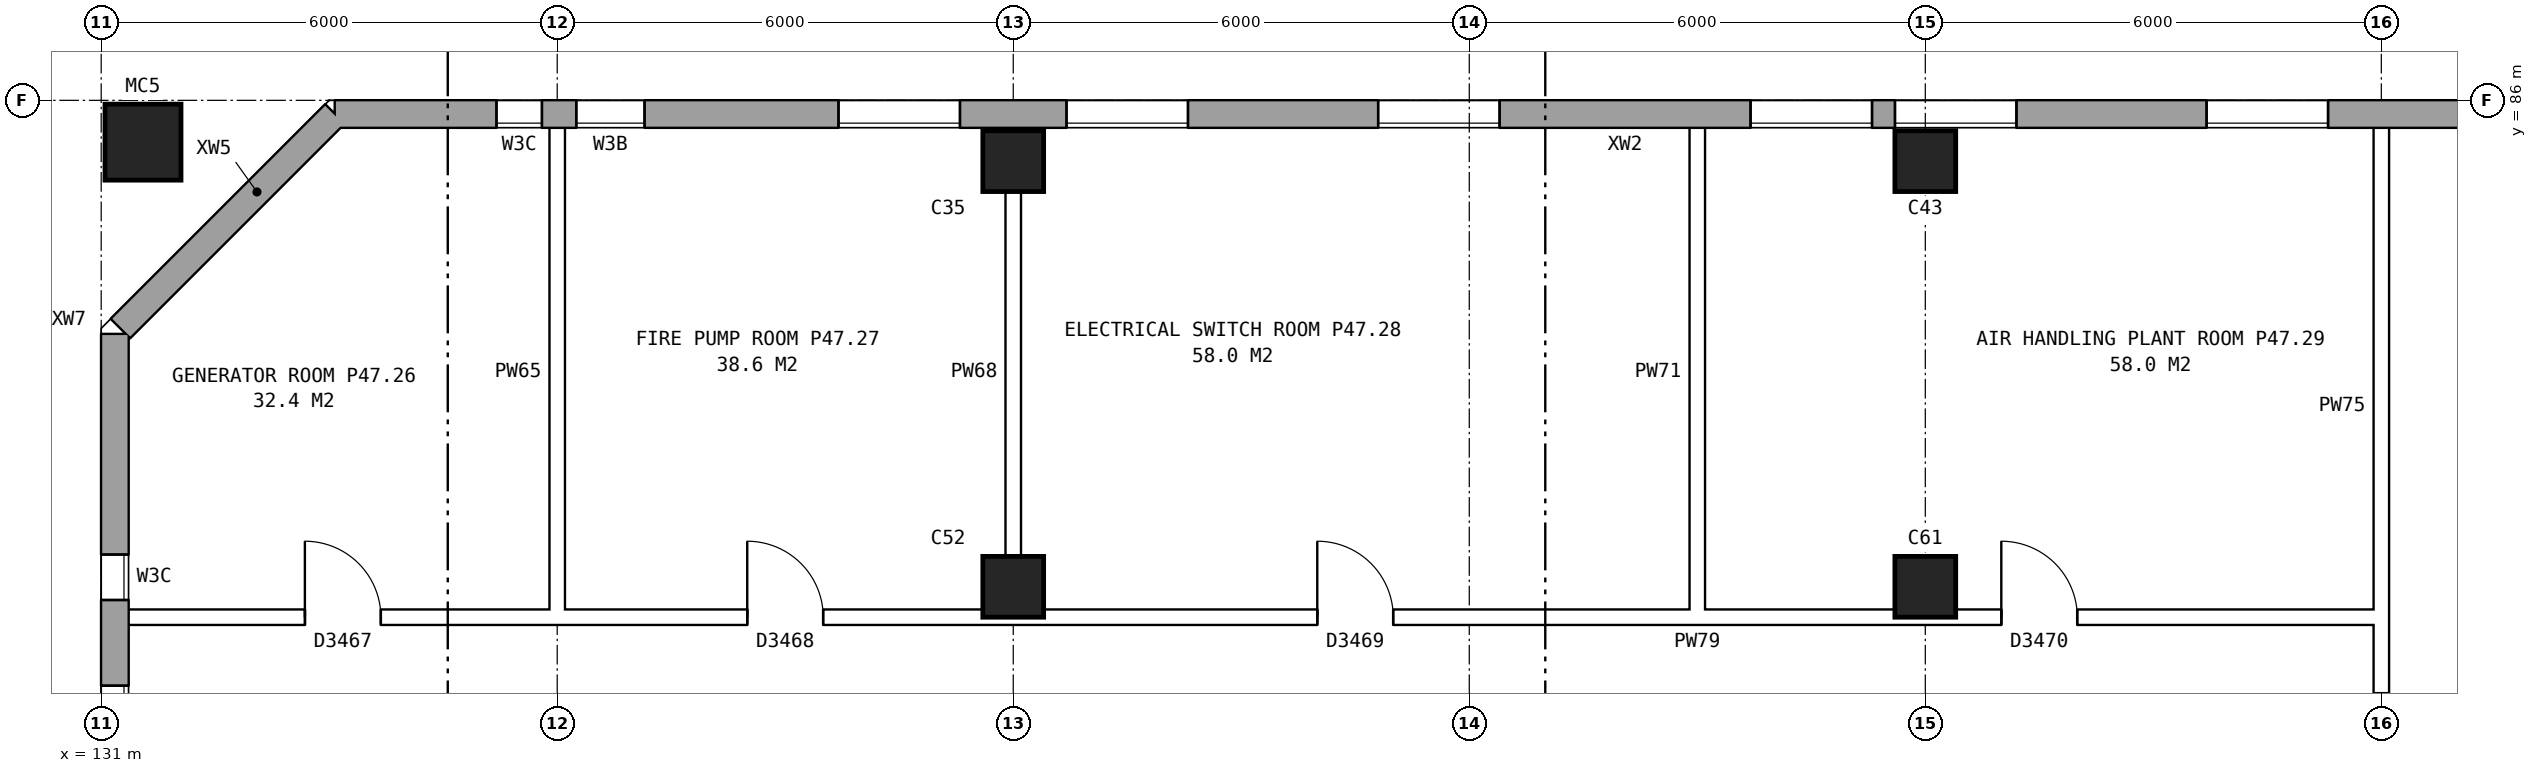
"""IFC4 building model, lengths in metres.
Left out: names, types, materials, properties, quantities, classifications, styles, units other than length and angle.
Written with IfcOpenShell. Run it as: python <this file> out.ifc"""

import sys

from ifc_helpers import new_model, si_unit, direction, frame, frame_2d, origin, origin_2d, place, context, subcontext, project, spatial, rectangle, hollow_rectangle, extrude, element, fill, save


model = new_model("IFC4")
c1 = context("Model", 3, precision=1e-05, world=origin(), true_north=direction((0.0, 1.0)))
c2 = subcontext(c1, "Body", "Model", "MODEL_VIEW")
j1 = project(units=[si_unit("LENGTHUNIT", "METRE"), si_unit("PLANEANGLEUNIT", "RADIAN")], contexts=[c1])
p1 = place(None, origin())
s1 = spatial("IfcSite", under=j1, at=p1, CompositionType="ELEMENT")
p2 = place(p1, origin())
s2 = spatial("IfcBuilding", under=s1, at=p2, CompositionType="ELEMENT")
p3 = place(p2, frame((0.0, 0.0, 167.1)))
s3 = spatial("IfcBuildingStorey", under=s2, at=p3, CompositionType="ELEMENT", Elevation=167.1)
for number, where, z_axis, x_axis in (
    (1, (143.0, 79.6, 0.0), (0.0, 0.0, 1.0), (1.0, 0.0, 0.0)),
    (2, (143.0, 85.2, 0.0), (0.0, 0.0, 1.0), (1.0, 0.0, 0.0)),
    (3, (155.0, 79.6, 0.0), (0.0, 0.0, 1.0), (1.0, 0.0, 0.0)),
    (4, (155.0, 85.2, 0.0), (0.0, 0.0, 1.0), (1.0, 0.0, 0.0)),
):
    element("IfcColumn", number, at=place(p3, frame(where, z_axis=z_axis, x_axis=x_axis)), inside=s3, PredefinedType="COLUMN", context=c2, shape_type="SweptSolid", body=[
        extrude(rectangle(XDim=0.8, YDim=0.8, at=origin_2d()), origin(), (0.0, 0.0, 1.0), 4.2),
    ])
p4 = place(p3, frame((131.55, 85.45, 0.0), z_axis=(0.0, 0.0, 1.0), x_axis=(1.0, 0.0, 0.0)))
e5 = element("IfcColumn", 5, at=p4, inside=s3, PredefinedType="COLUMN", context=c2, shape_type="SweptSolid", body=[
    extrude(hollow_rectangle(XDim=1.0, YDim=1.0, WallThickness=0.055, at=origin_2d()), origin(), (0.0, 0.0, 1.0), 4.5),
])
p5 = place(p3, frame((167.175, 85.82, 0.0), z_axis=(0.0, 0.0, 1.0), x_axis=(-1.0, 0.0, 0.0)))
e6 = element("IfcWall", 6, at=p5, inside=s3, PredefinedType="STANDARD", context=c2, shape_type="SweptSolid", body=[
    extrude(rectangle(XDim=33.101, YDim=0.36, at=frame_2d((16.55, 0.0))), origin(), (0.0, 0.0, 1.0), 4.2),
])
p6 = place(p5, frame((0.875, 0.0, 1.5)))
e7 = element("IfcOpeningElement", 7, at=p6, cuts=e6, PredefinedType="OPENING", context=c2, shape_type="SweptSolid", body=[
    extrude(rectangle(XDim=1.6, YDim=1.2, at=frame_2d((0.8, 0.6))), frame((0.0, 0.19, 0.0), z_axis=(0.0, -1.0, 0.0), x_axis=(1.0, 0.0, 0.0)), (0.0, 0.0, 1.0), 0.38),
])
p7 = place(p5, frame((2.8, 0.0, 1.5)))
e8 = element("IfcOpeningElement", 8, at=p7, cuts=e6, PredefinedType="OPENING", context=c2, shape_type="SweptSolid", body=[
    extrude(rectangle(XDim=1.2, YDim=1.2, at=frame_2d((0.6, 0.6))), frame((0.0, 0.19, 0.0), z_axis=(0.0, -1.0, 0.0), x_axis=(1.0, 0.0, 0.0)), (0.0, 0.0, 1.0), 0.38),
])
p8 = place(p5, frame((6.875, 0.0, 1.5)))
e9 = element("IfcOpeningElement", 9, at=p8, cuts=e6, PredefinedType="OPENING", context=c2, shape_type="SweptSolid", body=[
    extrude(rectangle(XDim=1.6, YDim=1.2, at=frame_2d((0.8, 0.6))), frame((0.0, 0.19, 0.0), z_axis=(0.0, -1.0, 0.0), x_axis=(1.0, 0.0, 0.0)), (0.0, 0.0, 1.0), 0.38),
])
p9 = place(p5, frame((10.975, 0.0, 1.5)))
e10 = element("IfcOpeningElement", 10, at=p9, cuts=e6, PredefinedType="OPENING", context=c2, shape_type="SweptSolid", body=[
    extrude(rectangle(XDim=1.6, YDim=1.2, at=frame_2d((0.8, 0.6))), frame((0.0, 0.19, 0.0), z_axis=(0.0, -1.0, 0.0), x_axis=(1.0, 0.0, 0.0)), (0.0, 0.0, 1.0), 0.38),
])
p10 = place(p5, frame((12.875, 0.0, 1.5)))
e11 = element("IfcOpeningElement", 11, at=p10, cuts=e6, PredefinedType="OPENING", context=c2, shape_type="SweptSolid", body=[
    extrude(rectangle(XDim=1.6, YDim=1.2, at=frame_2d((0.8, 0.6))), frame((0.0, 0.19, 0.0), z_axis=(0.0, -1.0, 0.0), x_axis=(1.0, 0.0, 0.0)), (0.0, 0.0, 1.0), 0.38),
])
p11 = place(p5, frame((17.775, 0.0, 1.5)))
e12 = element("IfcOpeningElement", 12, at=p11, cuts=e6, PredefinedType="OPENING", context=c2, shape_type="SweptSolid", body=[
    extrude(rectangle(XDim=1.6, YDim=1.2, at=frame_2d((0.8, 0.6))), frame((0.0, 0.19, 0.0), z_axis=(0.0, -1.0, 0.0), x_axis=(1.0, 0.0, 0.0)), (0.0, 0.0, 1.0), 0.38),
])
p12 = place(p5, frame((21.875, 0.0, 1.5)))
e13 = element("IfcOpeningElement", 13, at=p12, cuts=e6, PredefinedType="OPENING", context=c2, shape_type="SweptSolid", body=[
    extrude(rectangle(XDim=1.6, YDim=1.2, at=frame_2d((0.8, 0.6))), frame((0.0, 0.19, 0.0), z_axis=(0.0, -1.0, 0.0), x_axis=(1.0, 0.0, 0.0)), (0.0, 0.0, 1.0), 0.38),
])
p13 = place(p5, frame((24.875, 0.0, 1.5)))
e14 = element("IfcOpeningElement", 14, at=p13, cuts=e6, PredefinedType="OPENING", context=c2, shape_type="SweptSolid", body=[
    extrude(rectangle(XDim=1.6, YDim=1.2, at=frame_2d((0.8, 0.6))), frame((0.0, 0.19, 0.0), z_axis=(0.0, -1.0, 0.0), x_axis=(1.0, 0.0, 0.0)), (0.0, 0.0, 1.0), 0.38),
])
p14 = place(p5, frame((29.025, 0.0, 1.5)))
e15 = element("IfcOpeningElement", 15, at=p14, cuts=e6, PredefinedType="OPENING", context=c2, shape_type="SweptSolid", body=[
    extrude(rectangle(XDim=0.9, YDim=1.2, at=frame_2d((0.45, 0.6))), frame((0.0, 0.19, 0.0), z_axis=(0.0, -1.0, 0.0), x_axis=(1.0, 0.0, 0.0)), (0.0, 0.0, 1.0), 0.38),
])
p15 = place(p5, frame((30.375, 0.0, 1.5)))
e16 = element("IfcOpeningElement", 16, at=p15, cuts=e6, PredefinedType="OPENING", context=c2, shape_type="SweptSolid", body=[
    extrude(rectangle(XDim=0.6, YDim=1.2, at=frame_2d((0.3, 0.6))), frame((0.0, 0.19, 0.0), z_axis=(0.0, -1.0, 0.0), x_axis=(1.0, 0.0, 0.0)), (0.0, 0.0, 1.0), 0.38),
])
p16 = place(p3, frame((134.075, 85.82, 0.0), z_axis=(0.0, 0.0, 1.0), x_axis=(-0.707148882153, -0.707064677713, 0.0)))
e17 = element("IfcWall", 17, at=p16, inside=s3, PredefinedType="STANDARD", context=c2, shape_type="SweptSolid", body=[
    extrude(rectangle(XDim=2.899, YDim=0.36, at=frame_2d((1.45, 0.0))), origin(), (0.0, 0.0, 1.0), 4.2),
])
p17 = place(p3, frame((132.024, 83.77, 0.953), z_axis=(0.0, 0.0, 1.0), x_axis=(-0.706994764273, -0.707218780358, 0.0)))
e18 = element("IfcWall", 18, at=p17, inside=s3, PredefinedType="STANDARD", context=c2, shape_type="SweptSolid", body=[
    extrude(rectangle(XDim=1.09, YDim=0.36, at=frame_2d((0.545, 0.0))), origin(), (0.0, 0.0, 1.0), 2.444),
])
p18 = place(p3, frame((131.18, 82.925, 0.0), z_axis=(0.0, 0.0, 1.0), x_axis=(0.0, -1.0, 0.0)))
e19 = element("IfcWall", 19, at=p18, inside=s3, PredefinedType="STANDARD", context=c2, shape_type="SweptSolid", body=[
    extrude(rectangle(XDim=25.851, YDim=0.36, at=frame_2d((12.925, 0.0))), origin(), (0.0, 0.0, 1.0), 4.2),
])
p19 = place(p18, frame((2.9, 0.0, 1.5)))
e20 = element("IfcOpeningElement", 20, at=p19, cuts=e19, PredefinedType="OPENING", context=c2, shape_type="SweptSolid", body=[
    extrude(rectangle(XDim=0.6, YDim=1.2, at=frame_2d((0.3, 0.6))), frame((0.0, 0.19, 0.0), z_axis=(0.0, -1.0, 0.0), x_axis=(1.0, 0.0, 0.0)), (0.0, 0.0, 1.0), 0.38),
])
p20 = place(p18, frame((4.625, 0.0, 1.5)))
e21 = element("IfcOpeningElement", 21, at=p20, cuts=e19, PredefinedType="OPENING", context=c2, shape_type="SweptSolid", body=[
    extrude(rectangle(XDim=1.6, YDim=1.2, at=frame_2d((0.8, 0.6))), frame((0.0, 0.19, 0.0), z_axis=(0.0, -1.0, 0.0), x_axis=(1.0, 0.0, 0.0)), (0.0, 0.0, 1.0), 0.38),
])
p21 = place(p18, frame((21.1, 0.0, 1.5)))
e22 = element("IfcOpeningElement", 22, at=p21, cuts=e19, PredefinedType="OPENING", context=c2, shape_type="SweptSolid", body=[
    extrude(rectangle(XDim=0.6, YDim=1.2, at=frame_2d((0.3, 0.6))), frame((0.0, 0.19, 0.0), z_axis=(0.0, -1.0, 0.0), x_axis=(1.0, 0.0, 0.0)), (0.0, 0.0, 1.0), 0.38),
])
p22 = place(p18, frame((22.325, 0.0, 1.5)))
e23 = element("IfcOpeningElement", 23, at=p22, cuts=e19, PredefinedType="OPENING", context=c2, shape_type="SweptSolid", body=[
    extrude(rectangle(XDim=0.6, YDim=1.2, at=frame_2d((0.3, 0.6))), frame((0.0, 0.19, 0.0), z_axis=(0.0, -1.0, 0.0), x_axis=(1.0, 0.0, 0.0)), (0.0, 0.0, 1.0), 0.38),
])
p23 = place(p3, frame((131.24, 79.2, 0.0), z_axis=(0.0, 0.0, 1.0), x_axis=(1.0, 0.0, 0.0)))
e24 = element("IfcWall", 24, at=p23, inside=s3, PredefinedType="PARTITIONING", context=c2, shape_type="SweptSolid", body=[
    extrude(rectangle(XDim=29.86, YDim=0.2, at=frame_2d((14.93, 0.0))), origin(), (0.0, 0.0, 1.0), 4.2),
])
p24 = place(p23, frame((2.44, 0.0, 0.0)))
e25 = element("IfcOpeningElement", 25, at=p24, cuts=e24, PredefinedType="OPENING", context=c2, shape_type="SweptSolid", body=[
    extrude(rectangle(XDim=1.0, YDim=2.1, at=frame_2d((0.5, 1.05))), frame((0.0, 0.11, 0.0), z_axis=(0.0, -1.0, 0.0), x_axis=(1.0, 0.0, 0.0)), (0.0, 0.0, 1.0), 0.22),
])
p25 = place(p23, frame((8.26, 0.0, 0.0)))
e26 = element("IfcOpeningElement", 26, at=p25, cuts=e24, PredefinedType="OPENING", context=c2, shape_type="SweptSolid", body=[
    extrude(rectangle(XDim=1.0, YDim=2.1, at=frame_2d((0.5, 1.05))), frame((0.0, 0.11, 0.0), z_axis=(0.0, -1.0, 0.0), x_axis=(1.0, 0.0, 0.0)), (0.0, 0.0, 1.0), 0.22),
])
p26 = place(p23, frame((15.76, 0.0, 0.0)))
e27 = element("IfcOpeningElement", 27, at=p26, cuts=e24, PredefinedType="OPENING", context=c2, shape_type="SweptSolid", body=[
    extrude(rectangle(XDim=1.0, YDim=2.1, at=frame_2d((0.5, 1.05))), frame((0.0, 0.11, 0.0), z_axis=(0.0, -1.0, 0.0), x_axis=(1.0, 0.0, 0.0)), (0.0, 0.0, 1.0), 0.22),
])
p27 = place(p23, frame((24.76, 0.0, 0.0)))
e28 = element("IfcOpeningElement", 28, at=p27, cuts=e24, PredefinedType="OPENING", context=c2, shape_type="SweptSolid", body=[
    extrude(rectangle(XDim=1.0, YDim=2.1, at=frame_2d((0.5, 1.05))), frame((0.0, 0.11, 0.0), z_axis=(0.0, -1.0, 0.0), x_axis=(1.0, 0.0, 0.0)), (0.0, 0.0, 1.0), 0.22),
])
for number, where, z_axis, x_axis in (
    (29, (137.0, 79.1, 0.0), (0.0, 0.0, 1.0), (0.0, 1.0, 0.0)),
    (30, (143.0, 79.1, 0.0), (0.0, 0.0, 1.0), (0.0, 1.0, 0.0)),
    (31, (152.0, 79.1, 0.0), (0.0, 0.0, 1.0), (0.0, 1.0, 0.0)),
):
    element("IfcWall", number, at=place(p3, frame(where, z_axis=z_axis, x_axis=x_axis)), inside=s3, PredefinedType="PARTITIONING", context=c2, shape_type="SweptSolid", body=[
        extrude(rectangle(XDim=6.66, YDim=0.2, at=frame_2d((3.33, 0.0))), origin(), (0.0, 0.0, 1.0), 4.2),
    ])
p28 = place(p3, frame((161.0, 76.2, 0.0), z_axis=(0.0, 0.0, 1.0), x_axis=(0.0, 1.0, 0.0)))
e32 = element("IfcWall", 32, at=p28, inside=s3, PredefinedType="PARTITIONING", context=c2, shape_type="SweptSolid", body=[
    extrude(rectangle(XDim=9.56, YDim=0.2, at=frame_2d((4.78, 0.0))), origin(), (0.0, 0.0, 1.0), 4.2),
])
p29 = place(p28, frame((1.001, 0.0, 0.0)))
e33 = element("IfcOpeningElement", 33, at=p29, cuts=e32, PredefinedType="OPENING", context=c2, shape_type="SweptSolid", body=[
    extrude(rectangle(XDim=1.0, YDim=2.1, at=frame_2d((0.5, 1.05))), frame((0.0, 0.11, 0.0), z_axis=(0.0, -1.0, 0.0), x_axis=(1.0, 0.0, 0.0)), (0.0, 0.0, 1.0), 0.22),
])
p30 = place(p8, origin())
e34 = element("IfcWindow", 34, at=p30, inside=s3, PartitioningType="DOUBLE_PANEL_HORIZONTAL", PredefinedType="WINDOW", context=c2, shape_type="SweptSolid", body=[
    extrude(rectangle(XDim=1.6, YDim=1.2, at=frame_2d((0.8, 0.6))), frame((0.0, 0.15, 0.0), z_axis=(0.0, -1.0, 0.0), x_axis=(1.0, 0.0, 0.0)), (0.0, 0.0, 1.0), 0.06),
])
fill(e9, e34)
p31 = place(p9, origin())
e35 = element("IfcWindow", 35, at=p31, inside=s3, PartitioningType="DOUBLE_PANEL_HORIZONTAL", PredefinedType="WINDOW", context=c2, shape_type="SweptSolid", body=[
    extrude(rectangle(XDim=1.6, YDim=1.2, at=frame_2d((0.8, 0.6))), frame((0.0, 0.15, 0.0), z_axis=(0.0, -1.0, 0.0), x_axis=(1.0, 0.0, 0.0)), (0.0, 0.0, 1.0), 0.06),
])
fill(e10, e35)
p32 = place(p10, origin())
e36 = element("IfcWindow", 36, at=p32, inside=s3, PartitioningType="DOUBLE_PANEL_HORIZONTAL", PredefinedType="WINDOW", context=c2, shape_type="SweptSolid", body=[
    extrude(rectangle(XDim=1.6, YDim=1.2, at=frame_2d((0.8, 0.6))), frame((0.0, 0.15, 0.0), z_axis=(0.0, -1.0, 0.0), x_axis=(1.0, 0.0, 0.0)), (0.0, 0.0, 1.0), 0.06),
])
fill(e11, e36)
p33 = place(p11, origin())
e37 = element("IfcWindow", 37, at=p33, inside=s3, PartitioningType="DOUBLE_PANEL_HORIZONTAL", PredefinedType="WINDOW", context=c2, shape_type="SweptSolid", body=[
    extrude(rectangle(XDim=1.6, YDim=1.2, at=frame_2d((0.8, 0.6))), frame((0.0, 0.15, 0.0), z_axis=(0.0, -1.0, 0.0), x_axis=(1.0, 0.0, 0.0)), (0.0, 0.0, 1.0), 0.06),
])
fill(e12, e37)
p34 = place(p12, origin())
e38 = element("IfcWindow", 38, at=p34, inside=s3, PartitioningType="DOUBLE_PANEL_HORIZONTAL", PredefinedType="WINDOW", context=c2, shape_type="SweptSolid", body=[
    extrude(rectangle(XDim=1.6, YDim=1.2, at=frame_2d((0.8, 0.6))), frame((0.0, 0.15, 0.0), z_axis=(0.0, -1.0, 0.0), x_axis=(1.0, 0.0, 0.0)), (0.0, 0.0, 1.0), 0.06),
])
fill(e13, e38)
p35 = place(p13, origin())
e39 = element("IfcWindow", 39, at=p35, inside=s3, PartitioningType="DOUBLE_PANEL_HORIZONTAL", PredefinedType="WINDOW", context=c2, shape_type="SweptSolid", body=[
    extrude(rectangle(XDim=1.6, YDim=1.2, at=frame_2d((0.8, 0.6))), frame((0.0, 0.15, 0.0), z_axis=(0.0, -1.0, 0.0), x_axis=(1.0, 0.0, 0.0)), (0.0, 0.0, 1.0), 0.06),
])
fill(e14, e39)
p36 = place(p14, origin())
e40 = element("IfcWindow", 40, at=p36, inside=s3, PartitioningType="DOUBLE_PANEL_HORIZONTAL", PredefinedType="WINDOW", context=c2, shape_type="SweptSolid", body=[
    extrude(rectangle(XDim=0.9, YDim=1.2, at=frame_2d((0.45, 0.6))), frame((0.0, 0.15, 0.0), z_axis=(0.0, -1.0, 0.0), x_axis=(1.0, 0.0, 0.0)), (0.0, 0.0, 1.0), 0.06),
])
fill(e15, e40)
p37 = place(p15, origin())
e41 = element("IfcWindow", 41, at=p37, inside=s3, PartitioningType="DOUBLE_PANEL_HORIZONTAL", PredefinedType="WINDOW", context=c2, shape_type="SweptSolid", body=[
    extrude(rectangle(XDim=0.6, YDim=1.2, at=frame_2d((0.3, 0.6))), frame((0.0, 0.15, 0.0), z_axis=(0.0, -1.0, 0.0), x_axis=(1.0, 0.0, 0.0)), (0.0, 0.0, 1.0), 0.06),
])
fill(e16, e41)
p38 = place(p19, origin())
e42 = element("IfcWindow", 42, at=p38, inside=s3, PartitioningType="DOUBLE_PANEL_HORIZONTAL", PredefinedType="WINDOW", context=c2, shape_type="SweptSolid", body=[
    extrude(rectangle(XDim=0.6, YDim=1.2, at=frame_2d((0.3, 0.6))), frame((0.0, 0.15, 0.0), z_axis=(0.0, -1.0, 0.0), x_axis=(1.0, 0.0, 0.0)), (0.0, 0.0, 1.0), 0.06),
])
fill(e20, e42)
p39 = place(p20, origin())
e43 = element("IfcWindow", 43, at=p39, inside=s3, PartitioningType="DOUBLE_PANEL_HORIZONTAL", PredefinedType="WINDOW", context=c2, shape_type="SweptSolid", body=[
    extrude(rectangle(XDim=1.6, YDim=1.2, at=frame_2d((0.8, 0.6))), frame((0.0, 0.15, 0.0), z_axis=(0.0, -1.0, 0.0), x_axis=(1.0, 0.0, 0.0)), (0.0, 0.0, 1.0), 0.06),
])
fill(e21, e43)
p40 = place(p24, origin())
e44 = element("IfcDoor", 44, at=p40, inside=s3, OperationType="SINGLE_SWING_LEFT", PredefinedType="DOOR", context=c2, shape_type="SweptSolid", body=[
    extrude(rectangle(XDim=1.0, YDim=2.1, at=frame_2d((0.5, 1.05))), frame((0.0, 0.025, 0.0), z_axis=(0.0, -1.0, 0.0), x_axis=(1.0, 0.0, 0.0)), (0.0, 0.0, 1.0), 0.05),
])
fill(e25, e44)
p41 = place(p25, origin())
e45 = element("IfcDoor", 45, at=p41, inside=s3, OperationType="SINGLE_SWING_LEFT", PredefinedType="DOOR", context=c2, shape_type="SweptSolid", body=[
    extrude(rectangle(XDim=1.0, YDim=2.1, at=frame_2d((0.5, 1.05))), frame((0.0, 0.025, 0.0), z_axis=(0.0, -1.0, 0.0), x_axis=(1.0, 0.0, 0.0)), (0.0, 0.0, 1.0), 0.05),
])
fill(e26, e45)
p42 = place(p26, origin())
e46 = element("IfcDoor", 46, at=p42, inside=s3, OperationType="SINGLE_SWING_LEFT", PredefinedType="DOOR", context=c2, shape_type="SweptSolid", body=[
    extrude(rectangle(XDim=1.0, YDim=2.1, at=frame_2d((0.5, 1.05))), frame((0.0, 0.025, 0.0), z_axis=(0.0, -1.0, 0.0), x_axis=(1.0, 0.0, 0.0)), (0.0, 0.0, 1.0), 0.05),
])
fill(e27, e46)
p43 = place(p27, origin())
e47 = element("IfcDoor", 47, at=p43, inside=s3, OperationType="SINGLE_SWING_LEFT", PredefinedType="DOOR", context=c2, shape_type="SweptSolid", body=[
    extrude(rectangle(XDim=1.0, YDim=2.1, at=frame_2d((0.5, 1.05))), frame((0.0, 0.025, 0.0), z_axis=(0.0, -1.0, 0.0), x_axis=(1.0, 0.0, 0.0)), (0.0, 0.0, 1.0), 0.05),
])
fill(e28, e47)
p44 = place(p29, frame((1.0, 0.0, 0.0), z_axis=(0.0, 0.0, 1.0), x_axis=(-1.0, 0.0, 0.0)))
e48 = element("IfcDoor", 48, at=p44, inside=s3, OperationType="SINGLE_SWING_RIGHT", PredefinedType="DOOR", context=c2, shape_type="SweptSolid", body=[
    extrude(rectangle(XDim=1.0, YDim=2.1, at=frame_2d((0.5, 1.05))), frame((0.0, 0.025, 0.0), z_axis=(0.0, -1.0, 0.0), x_axis=(1.0, 0.0, 0.0)), (0.0, 0.0, 1.0), 0.05),
])
fill(e33, e48)
save(model, sys.argv[1])
